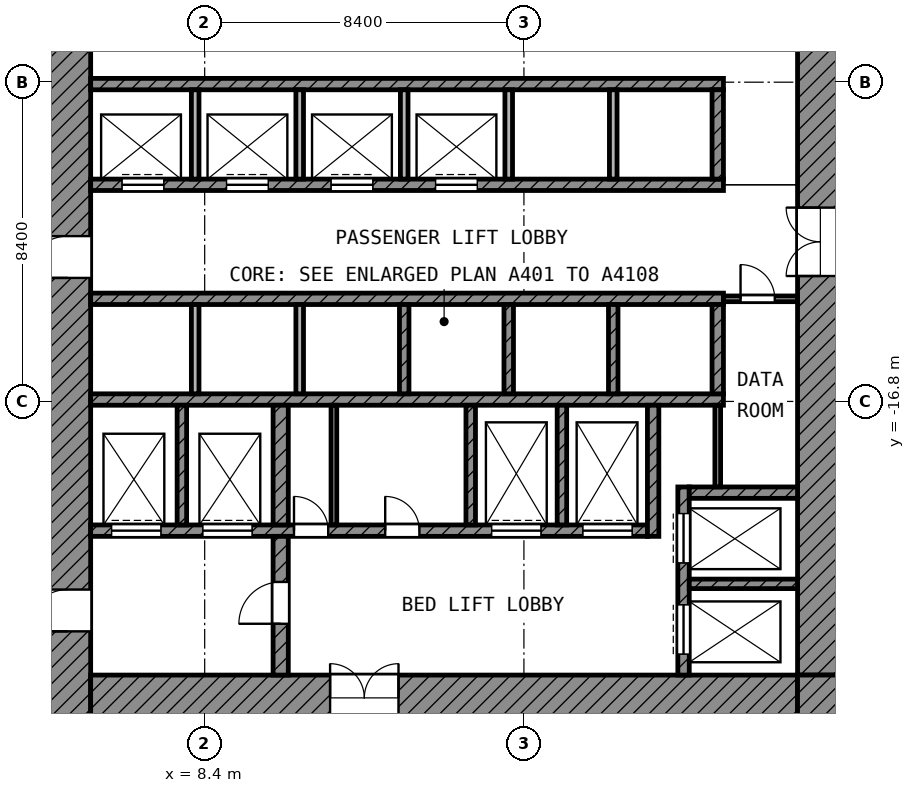
"""IFC4 building model, lengths in metres.
Left out: names, types, materials, properties, quantities, classifications, styles, units other than length and angle.
Written with IfcOpenShell. Run it as: python <this file> out.ifc"""

import sys

from ifc_helpers import new_model, si_unit, direction, frame, frame_2d, origin, place, context, subcontext, project, spatial, rectangle, extrude, element, fill, save


model = new_model("IFC4")
c1 = context("Model", 3, precision=1e-05, world=origin(), true_north=direction((0.0, 1.0)))
c2 = subcontext(c1, "Body", "Model", "MODEL_VIEW")
j1 = project(units=[si_unit("LENGTHUNIT", "METRE"), si_unit("PLANEANGLEUNIT", "RADIAN")], contexts=[c1])
p1 = place(None, origin())
s1 = spatial("IfcSite", under=j1, at=p1, CompositionType="ELEMENT")
p2 = place(p1, origin())
s2 = spatial("IfcBuilding", under=s1, at=p2, CompositionType="ELEMENT")
p3 = place(p2, frame((0.0, 0.0, 18.2)))
s3 = spatial("IfcBuildingStorey", under=s2, at=p3, CompositionType="ELEMENT", Elevation=18.2)
p4 = place(p3, frame((4.8, -25.2, 0.0), z_axis=(0.0, 0.0, 1.0), x_axis=(0.0, 1.0, 0.0)))
e1 = element("IfcWall", 1, at=p4, inside=s3, PredefinedType="SHEAR", context=c2, shape_type="SweptSolid", body=[
    extrude(rectangle(XDim=19.8, YDim=1.2, at=frame_2d((9.9, 0.0))), origin(), (0.0, 0.0, 1.0), 5.05),
])
p5 = place(p4, frame((11.65, 0.0, 0.0)))
e2 = element("IfcOpeningElement", 2, at=p5, cuts=e1, PredefinedType="OPENING", context=c2, shape_type="SweptSolid", body=[
    extrude(rectangle(XDim=1.1, YDim=2.1, at=frame_2d((0.55, 1.05))), frame((0.0, 0.61, 0.0), z_axis=(0.0, -1.0, 0.0), x_axis=(1.0, 0.0, 0.0)), (0.0, 0.0, 1.0), 1.22),
])
p6 = place(p4, frame((2.35, 0.0, 0.0)))
e3 = element("IfcOpeningElement", 3, at=p6, cuts=e1, PredefinedType="OPENING", context=c2, shape_type="SweptSolid", body=[
    extrude(rectangle(XDim=1.1, YDim=2.1, at=frame_2d((0.55, 1.05))), frame((0.0, 0.61, 0.0), z_axis=(0.0, -1.0, 0.0), x_axis=(1.0, 0.0, 0.0)), (0.0, 0.0, 1.0), 1.22),
])
p7 = place(p3, frame((24.6, -24.0, 0.0), z_axis=(0.0, 0.0, 1.0), x_axis=(0.0, 1.0, 0.0)))
e4 = element("IfcWall", 4, at=p7, inside=s3, PredefinedType="SHEAR", context=c2, shape_type="SweptSolid", body=[
    extrude(rectangle(XDim=18.6, YDim=1.2, at=frame_2d((9.3, 0.0))), origin(), (0.0, 0.0, 1.0), 5.05),
])
p8 = place(p7, frame((10.5, 0.0, 0.0)))
e5 = element("IfcOpeningElement", 5, at=p8, cuts=e4, PredefinedType="OPENING", context=c2, shape_type="SweptSolid", body=[
    extrude(rectangle(XDim=1.8, YDim=2.1, at=frame_2d((0.9, 1.05))), frame((0.0, 0.61, 0.0), z_axis=(0.0, -1.0, 0.0), x_axis=(1.0, 0.0, 0.0)), (0.0, 0.0, 1.0), 1.22),
])
p9 = place(p3, frame((5.4, -24.6, 0.0), z_axis=(0.0, 0.0, 1.0), x_axis=(1.0, 0.0, 0.0)))
e6 = element("IfcWall", 6, at=p9, inside=s3, PredefinedType="SHEAR", context=c2, shape_type="SweptSolid", body=[
    extrude(rectangle(XDim=18.6, YDim=1.2, at=frame_2d((9.3, 0.0))), origin(), (0.0, 0.0, 1.0), 5.05),
])
p10 = place(p9, frame((6.3, 0.0, 0.0)))
e7 = element("IfcOpeningElement", 7, at=p10, cuts=e6, PredefinedType="OPENING", context=c2, shape_type="SweptSolid", body=[
    extrude(rectangle(XDim=1.8, YDim=2.1, at=frame_2d((0.9, 1.05))), frame((0.0, 0.61, 0.0), z_axis=(0.0, -1.0, 0.0), x_axis=(1.0, 0.0, 0.0)), (0.0, 0.0, 1.0), 1.22),
])
p11 = place(p3, frame((24.6, -25.2, 0.0), z_axis=(0.0, 0.0, 1.0), x_axis=(0.0, 1.0, 0.0)))
e8 = element("IfcWall", 8, at=p11, inside=s3, PredefinedType="SHEAR", context=c2, shape_type="SweptSolid", body=[
    extrude(rectangle(XDim=1.2, YDim=1.2, at=frame_2d((0.6, 0.0))), origin(), (0.0, 0.0, 1.0), 5.05),
])
p12 = place(p3, frame((5.4, -8.45, 0.0), z_axis=(0.0, 0.0, 1.0), x_axis=(1.0, 0.0, 0.0)))
e9 = element("IfcWall", 9, at=p12, inside=s3, PredefinedType="SHEAR", context=c2, shape_type="SweptSolid", body=[
    extrude(rectangle(XDim=16.65, YDim=0.3, at=frame_2d((8.325, 0.0))), origin(), (0.0, 0.0, 1.0), 5.05),
])
p13 = place(p3, frame((5.4, -11.1, 0.0), z_axis=(0.0, 0.0, 1.0), x_axis=(1.0, 0.0, 0.0)))
e10 = element("IfcWall", 10, at=p13, inside=s3, PredefinedType="SHEAR", context=c2, shape_type="SweptSolid", body=[
    extrude(rectangle(XDim=16.65, YDim=0.3, at=frame_2d((8.325, 0.0))), origin(), (0.0, 0.0, 1.0), 5.05),
])
p14 = place(p13, frame((0.825, 0.0, 0.0)))
e11 = element("IfcOpeningElement", 11, at=p14, cuts=e10, PredefinedType="OPENING", context=c2, shape_type="SweptSolid", body=[
    extrude(rectangle(XDim=1.1, YDim=2.1, at=frame_2d((0.55, 1.05))), frame((0.0, 0.16, 0.0), z_axis=(0.0, -1.0, 0.0), x_axis=(1.0, 0.0, 0.0)), (0.0, 0.0, 1.0), 0.32),
])
p15 = place(p13, frame((3.575, 0.0, 0.0)))
e12 = element("IfcOpeningElement", 12, at=p15, cuts=e10, PredefinedType="OPENING", context=c2, shape_type="SweptSolid", body=[
    extrude(rectangle(XDim=1.1, YDim=2.1, at=frame_2d((0.55, 1.05))), frame((0.0, 0.16, 0.0), z_axis=(0.0, -1.0, 0.0), x_axis=(1.0, 0.0, 0.0)), (0.0, 0.0, 1.0), 0.32),
])
p16 = place(p13, frame((6.325, 0.0, 0.0)))
e13 = element("IfcOpeningElement", 13, at=p16, cuts=e10, PredefinedType="OPENING", context=c2, shape_type="SweptSolid", body=[
    extrude(rectangle(XDim=1.1, YDim=2.1, at=frame_2d((0.55, 1.05))), frame((0.0, 0.16, 0.0), z_axis=(0.0, -1.0, 0.0), x_axis=(1.0, 0.0, 0.0)), (0.0, 0.0, 1.0), 0.32),
])
p17 = place(p13, frame((9.075, 0.0, 0.0)))
e14 = element("IfcOpeningElement", 14, at=p17, cuts=e10, PredefinedType="OPENING", context=c2, shape_type="SweptSolid", body=[
    extrude(rectangle(XDim=1.1, YDim=2.1, at=frame_2d((0.55, 1.05))), frame((0.0, 0.16, 0.0), z_axis=(0.0, -1.0, 0.0), x_axis=(1.0, 0.0, 0.0)), (0.0, 0.0, 1.0), 0.32),
])
for number, where, z_axis, x_axis in (
    (15, (5.4, -14.1, 0.0), (0.0, 0.0, 1.0), (1.0, 0.0, 0.0)),
    (16, (5.4, -16.75, 0.0), (0.0, 0.0, 1.0), (1.0, 0.0, 0.0)),
):
    element("IfcWall", number, at=place(p3, frame(where, z_axis=z_axis, x_axis=x_axis)), inside=s3, PredefinedType="SHEAR", context=c2, shape_type="SweptSolid", body=[
        extrude(rectangle(XDim=16.65, YDim=0.3, at=frame_2d((8.325, 0.0))), origin(), (0.0, 0.0, 1.0), 5.05),
    ])
p18 = place(p3, frame((5.4, -20.2, 0.0), z_axis=(0.0, 0.0, 1.0), x_axis=(1.0, 0.0, 0.0)))
e17 = element("IfcWall", 17, at=p18, inside=s3, PredefinedType="SHEAR", context=c2, shape_type="SweptSolid", body=[
    extrude(rectangle(XDim=14.65, YDim=0.3, at=frame_2d((7.325, 0.0))), origin(), (0.0, 0.0, 1.0), 5.05),
])
p19 = place(p18, frame((10.55, 0.0, 0.0)))
e18 = element("IfcOpeningElement", 18, at=p19, cuts=e17, PredefinedType="OPENING", context=c2, shape_type="SweptSolid", body=[
    extrude(rectangle(XDim=1.3, YDim=2.1, at=frame_2d((0.65, 1.05))), frame((0.0, 0.16, 0.0), z_axis=(0.0, -1.0, 0.0), x_axis=(1.0, 0.0, 0.0)), (0.0, 0.0, 1.0), 0.32),
])
p20 = place(p18, frame((12.95, 0.0, 0.0)))
e19 = element("IfcOpeningElement", 19, at=p20, cuts=e17, PredefinedType="OPENING", context=c2, shape_type="SweptSolid", body=[
    extrude(rectangle(XDim=1.3, YDim=2.1, at=frame_2d((0.65, 1.05))), frame((0.0, 0.16, 0.0), z_axis=(0.0, -1.0, 0.0), x_axis=(1.0, 0.0, 0.0)), (0.0, 0.0, 1.0), 0.32),
])
p21 = place(p18, frame((0.55, 0.0, 0.0)))
e20 = element("IfcOpeningElement", 20, at=p21, cuts=e17, PredefinedType="OPENING", context=c2, shape_type="SweptSolid", body=[
    extrude(rectangle(XDim=1.3, YDim=2.1, at=frame_2d((0.65, 1.05))), frame((0.0, 0.16, 0.0), z_axis=(0.0, -1.0, 0.0), x_axis=(1.0, 0.0, 0.0)), (0.0, 0.0, 1.0), 0.32),
])
p22 = place(p18, frame((2.95, 0.0, 0.0)))
e21 = element("IfcOpeningElement", 21, at=p22, cuts=e17, PredefinedType="OPENING", context=c2, shape_type="SweptSolid", body=[
    extrude(rectangle(XDim=1.3, YDim=2.1, at=frame_2d((0.65, 1.05))), frame((0.0, 0.16, 0.0), z_axis=(0.0, -1.0, 0.0), x_axis=(1.0, 0.0, 0.0)), (0.0, 0.0, 1.0), 0.32),
])
p23 = place(p18, frame((5.35, 0.0, 0.0)))
e22 = element("IfcOpeningElement", 22, at=p23, cuts=e17, PredefinedType="OPENING", context=c2, shape_type="SweptSolid", body=[
    extrude(rectangle(XDim=0.9, YDim=2.1, at=frame_2d((0.45, 1.05))), frame((0.0, 0.16, 0.0), z_axis=(0.0, -1.0, 0.0), x_axis=(1.0, 0.0, 0.0)), (0.0, 0.0, 1.0), 0.32),
])
p24 = place(p18, frame((7.75, 0.0, 0.0)))
e23 = element("IfcOpeningElement", 23, at=p24, cuts=e17, PredefinedType="OPENING", context=c2, shape_type="SweptSolid", body=[
    extrude(rectangle(XDim=0.9, YDim=2.1, at=frame_2d((0.45, 1.05))), frame((0.0, 0.16, 0.0), z_axis=(0.0, -1.0, 0.0), x_axis=(1.0, 0.0, 0.0)), (0.0, 0.0, 1.0), 0.32),
])
p25 = place(p3, frame((10.4, -24.0, 0.0), z_axis=(0.0, 0.0, 1.0), x_axis=(0.0, 1.0, 0.0)))
e24 = element("IfcWall", 24, at=p25, inside=s3, PredefinedType="SHEAR", context=c2, shape_type="SweptSolid", body=[
    extrude(rectangle(XDim=3.65, YDim=0.4, at=frame_2d((1.825, 0.0))), origin(), (0.0, 0.0, 1.0), 5.05),
])
p26 = place(p25, frame((1.35, 0.0, 0.0)))
e25 = element("IfcOpeningElement", 25, at=p26, cuts=e24, PredefinedType="OPENING", context=c2, shape_type="SweptSolid", body=[
    extrude(rectangle(XDim=1.1, YDim=2.1, at=frame_2d((0.55, 1.05))), frame((0.0, 0.21, 0.0), z_axis=(0.0, -1.0, 0.0), x_axis=(1.0, 0.0, 0.0)), (0.0, 0.0, 1.0), 0.42),
])
p27 = place(p3, frame((10.4, -20.05, 0.0), z_axis=(0.0, 0.0, 1.0), x_axis=(0.0, 1.0, 0.0)))
e26 = element("IfcWall", 26, at=p27, inside=s3, PredefinedType="SHEAR", context=c2, shape_type="SweptSolid", body=[
    extrude(rectangle(XDim=3.15, YDim=0.4, at=frame_2d((1.575, 0.0))), origin(), (0.0, 0.0, 1.0), 5.05),
])
p28 = place(p3, frame((20.2, -20.35, 0.0), z_axis=(0.0, 0.0, 1.0), x_axis=(0.0, 1.0, 0.0)))
e27 = element("IfcWall", 27, at=p28, inside=s3, PredefinedType="SHEAR", context=c2, shape_type="SweptSolid", body=[
    extrude(rectangle(XDim=3.45, YDim=0.3, at=frame_2d((1.725, 0.0))), origin(), (0.0, 0.0, 1.0), 5.05),
])
p29 = place(p3, frame((21.9, -10.95, 0.0), z_axis=(0.0, 0.0, 1.0), x_axis=(0.0, 1.0, 0.0)))
e28 = element("IfcWall", 28, at=p29, inside=s3, PredefinedType="SHEAR", context=c2, shape_type="SweptSolid", body=[
    extrude(rectangle(XDim=2.35, YDim=0.3, at=frame_2d((1.175, 0.0))), origin(), (0.0, 0.0, 1.0), 5.05),
])
p30 = place(p3, frame((21.9, -16.6, 0.0), z_axis=(0.0, 0.0, 1.0), x_axis=(0.0, 1.0, 0.0)))
e29 = element("IfcWall", 29, at=p30, inside=s3, PredefinedType="SHEAR", context=c2, shape_type="SweptSolid", body=[
    extrude(rectangle(XDim=2.35, YDim=0.3, at=frame_2d((1.175, 0.0))), origin(), (0.0, 0.0, 1.0), 5.05),
])
p31 = place(p3, frame((21.15, -19.2, 0.0), z_axis=(0.0, 0.0, 1.0), x_axis=(1.0, 0.0, 0.0)))
e30 = element("IfcWall", 30, at=p31, inside=s3, PredefinedType="SHEAR", context=c2, shape_type="SweptSolid", body=[
    extrude(rectangle(XDim=2.85, YDim=0.3, at=frame_2d((1.425, 0.0))), origin(), (0.0, 0.0, 1.0), 5.05),
])
p32 = place(p3, frame((21.0, -24.0, 0.0), z_axis=(0.0, 0.0, 1.0), x_axis=(0.0, 1.0, 0.0)))
e31 = element("IfcWall", 31, at=p32, inside=s3, PredefinedType="SHEAR", context=c2, shape_type="SweptSolid", body=[
    extrude(rectangle(XDim=4.95, YDim=0.3, at=frame_2d((2.475, 0.0))), origin(), (0.0, 0.0, 1.0), 5.05),
])
p33 = place(p32, frame((2.95, 0.0, 0.0)))
e32 = element("IfcOpeningElement", 32, at=p33, cuts=e31, PredefinedType="OPENING", context=c2, shape_type="SweptSolid", body=[
    extrude(rectangle(XDim=1.3, YDim=2.1, at=frame_2d((0.65, 1.05))), frame((0.0, 0.16, 0.0), z_axis=(0.0, -1.0, 0.0), x_axis=(1.0, 0.0, 0.0)), (0.0, 0.0, 1.0), 0.32),
])
p34 = place(p32, frame((0.55, 0.0, 0.0)))
e33 = element("IfcOpeningElement", 33, at=p34, cuts=e31, PredefinedType="OPENING", context=c2, shape_type="SweptSolid", body=[
    extrude(rectangle(XDim=1.3, YDim=2.1, at=frame_2d((0.65, 1.05))), frame((0.0, 0.16, 0.0), z_axis=(0.0, -1.0, 0.0), x_axis=(1.0, 0.0, 0.0)), (0.0, 0.0, 1.0), 0.32),
])
p35 = place(p3, frame((21.15, -21.6, 0.0), z_axis=(0.0, 0.0, 1.0), x_axis=(1.0, 0.0, 0.0)))
e34 = element("IfcWall", 34, at=p35, inside=s3, PredefinedType="SHEAR", context=c2, shape_type="SweptSolid", body=[
    extrude(rectangle(XDim=2.85, YDim=0.25, at=frame_2d((1.425, 0.0))), origin(), (0.0, 0.0, 1.0), 5.05),
])
for number, where, z_axis, x_axis in (
    (35, (7.8, -20.05, 0.0), (0.0, 0.0, 1.0), (0.0, 1.0, 0.0)),
    (36, (15.4, -20.05, 0.0), (0.0, 0.0, 1.0), (0.0, 1.0, 0.0)),
    (37, (17.8, -20.05, 0.0), (0.0, 0.0, 1.0), (0.0, 1.0, 0.0)),
):
    element("IfcWall", number, at=place(p3, frame(where, z_axis=z_axis, x_axis=x_axis)), inside=s3, PredefinedType="SHEAR", context=c2, shape_type="SweptSolid", body=[
        extrude(rectangle(XDim=3.15, YDim=0.25, at=frame_2d((1.575, 0.0))), origin(), (0.0, 0.0, 1.0), 5.05),
    ])
for number, where, z_axis, x_axis in (
    (38, (8.15, -10.95, 0.0), (0.0, 0.0, 1.0), (0.0, 1.0, 0.0)),
    (39, (10.9, -10.95, 0.0), (0.0, 0.0, 1.0), (0.0, 1.0, 0.0)),
    (40, (13.65, -10.95, 0.0), (0.0, 0.0, 1.0), (0.0, 1.0, 0.0)),
    (41, (16.4, -10.95, 0.0), (0.0, 0.0, 1.0), (0.0, 1.0, 0.0)),
    (42, (19.15, -10.95, 0.0), (0.0, 0.0, 1.0), (0.0, 1.0, 0.0)),
):
    element("IfcWall", number, at=place(p3, frame(where, z_axis=z_axis, x_axis=x_axis)), inside=s3, PredefinedType="PARTITIONING", context=c2, shape_type="SweptSolid", body=[
        extrude(rectangle(XDim=2.35, YDim=0.2, at=frame_2d((1.175, 0.0))), origin(), (0.0, 0.0, 1.0), 5.05),
    ])
for number, where, z_axis, x_axis in (
    (43, (8.15, -16.6, 0.0), (0.0, 0.0, 1.0), (0.0, 1.0, 0.0)),
    (44, (10.9, -16.6, 0.0), (0.0, 0.0, 1.0), (0.0, 1.0, 0.0)),
):
    element("IfcWall", number, at=place(p3, frame(where, z_axis=z_axis, x_axis=x_axis)), inside=s3, PredefinedType="PARTITIONING", context=c2, shape_type="SweptSolid", body=[
        extrude(rectangle(XDim=2.35, YDim=0.2, at=frame_2d((1.175, 0.0))), origin(), (0.0, 0.0, 1.0), 5.05),
    ])
for number, where, z_axis, x_axis in (
    (45, (13.65, -16.6, 0.0), (0.0, 0.0, 1.0), (0.0, 1.0, 0.0)),
    (46, (16.4, -16.6, 0.0), (0.0, 0.0, 1.0), (0.0, 1.0, 0.0)),
    (47, (19.15, -16.6, 0.0), (0.0, 0.0, 1.0), (0.0, 1.0, 0.0)),
):
    element("IfcWall", number, at=place(p3, frame(where, z_axis=z_axis, x_axis=x_axis)), inside=s3, PredefinedType="SHEAR", context=c2, shape_type="SweptSolid", body=[
        extrude(rectangle(XDim=2.35, YDim=0.25, at=frame_2d((1.175, 0.0))), origin(), (0.0, 0.0, 1.0), 5.05),
    ])
p36 = place(p3, frame((21.9, -19.05, 0.0), z_axis=(0.0, 0.0, 1.0), x_axis=(0.0, 1.0, 0.0)))
e48 = element("IfcWall", 48, at=p36, inside=s3, PredefinedType="PARTITIONING", context=c2, shape_type="SweptSolid", body=[
    extrude(rectangle(XDim=2.15, YDim=0.15, at=frame_2d((1.075, 0.0))), origin(), (0.0, 0.0, 1.0), 5.05),
])
p37 = place(p3, frame((22.05, -14.1, 0.0), z_axis=(0.0, 0.0, 1.0), x_axis=(1.0, 0.0, 0.0)))
e49 = element("IfcWall", 49, at=p37, inside=s3, PredefinedType="PARTITIONING", context=c2, shape_type="SweptSolid", body=[
    extrude(rectangle(XDim=1.95, YDim=0.15, at=frame_2d((0.975, 0.0))), origin(), (0.0, 0.0, 1.0), 5.05),
])
p38 = place(p37, frame((0.45, 0.0, 0.0)))
e50 = element("IfcOpeningElement", 50, at=p38, cuts=e49, PredefinedType="OPENING", context=c2, shape_type="SweptSolid", body=[
    extrude(rectangle(XDim=0.9, YDim=2.1, at=frame_2d((0.45, 1.05))), frame((0.0, 0.085, 0.0), z_axis=(0.0, -1.0, 0.0), x_axis=(1.0, 0.0, 0.0)), (0.0, 0.0, 1.0), 0.17),
])
p39 = place(p3, frame((11.8, -20.05, 0.0), z_axis=(0.0, 0.0, 1.0), x_axis=(0.0, 1.0, 0.0)))
e51 = element("IfcWall", 51, at=p39, inside=s3, PredefinedType="PARTITIONING", context=c2, shape_type="SweptSolid", body=[
    extrude(rectangle(XDim=3.15, YDim=0.15, at=frame_2d((1.575, 0.0))), origin(), (0.0, 0.0, 1.0), 5.05),
])
p40 = place(p14, origin())
e52 = element("IfcDoor", 52, at=p40, inside=s3, OperationType="DOUBLE_DOOR_SLIDING", PredefinedType="DOOR", context=c2, shape_type="SweptSolid", body=[
    extrude(rectangle(XDim=1.1, YDim=2.1, at=frame_2d((0.55, 1.05))), frame((0.0, 0.025, 0.0), z_axis=(0.0, -1.0, 0.0), x_axis=(1.0, 0.0, 0.0)), (0.0, 0.0, 1.0), 0.05),
])
fill(e11, e52)
p41 = place(p15, origin())
e53 = element("IfcDoor", 53, at=p41, inside=s3, OperationType="DOUBLE_DOOR_SLIDING", PredefinedType="DOOR", context=c2, shape_type="SweptSolid", body=[
    extrude(rectangle(XDim=1.1, YDim=2.1, at=frame_2d((0.55, 1.05))), frame((0.0, 0.025, 0.0), z_axis=(0.0, -1.0, 0.0), x_axis=(1.0, 0.0, 0.0)), (0.0, 0.0, 1.0), 0.05),
])
fill(e12, e53)
p42 = place(p16, origin())
e54 = element("IfcDoor", 54, at=p42, inside=s3, OperationType="DOUBLE_DOOR_SLIDING", PredefinedType="DOOR", context=c2, shape_type="SweptSolid", body=[
    extrude(rectangle(XDim=1.1, YDim=2.1, at=frame_2d((0.55, 1.05))), frame((0.0, 0.025, 0.0), z_axis=(0.0, -1.0, 0.0), x_axis=(1.0, 0.0, 0.0)), (0.0, 0.0, 1.0), 0.05),
])
fill(e13, e54)
p43 = place(p17, origin())
e55 = element("IfcDoor", 55, at=p43, inside=s3, OperationType="DOUBLE_DOOR_SLIDING", PredefinedType="DOOR", context=c2, shape_type="SweptSolid", body=[
    extrude(rectangle(XDim=1.1, YDim=2.1, at=frame_2d((0.55, 1.05))), frame((0.0, 0.025, 0.0), z_axis=(0.0, -1.0, 0.0), x_axis=(1.0, 0.0, 0.0)), (0.0, 0.0, 1.0), 0.05),
])
fill(e14, e55)
p44 = place(p33, origin())
e56 = element("IfcDoor", 56, at=p44, inside=s3, OperationType="DOUBLE_DOOR_SLIDING", PredefinedType="DOOR", context=c2, shape_type="SweptSolid", body=[
    extrude(rectangle(XDim=1.3, YDim=2.1, at=frame_2d((0.65, 1.05))), frame((0.0, 0.025, 0.0), z_axis=(0.0, -1.0, 0.0), x_axis=(1.0, 0.0, 0.0)), (0.0, 0.0, 1.0), 0.05),
])
fill(e32, e56)
p45 = place(p34, origin())
e57 = element("IfcDoor", 57, at=p45, inside=s3, OperationType="DOUBLE_DOOR_SLIDING", PredefinedType="DOOR", context=c2, shape_type="SweptSolid", body=[
    extrude(rectangle(XDim=1.3, YDim=2.1, at=frame_2d((0.65, 1.05))), frame((0.0, 0.025, 0.0), z_axis=(0.0, -1.0, 0.0), x_axis=(1.0, 0.0, 0.0)), (0.0, 0.0, 1.0), 0.05),
])
fill(e33, e57)
p46 = place(p19, origin())
e58 = element("IfcDoor", 58, at=p46, inside=s3, OperationType="DOUBLE_DOOR_SLIDING", PredefinedType="DOOR", context=c2, shape_type="SweptSolid", body=[
    extrude(rectangle(XDim=1.3, YDim=2.1, at=frame_2d((0.65, 1.05))), frame((0.0, 0.025, 0.0), z_axis=(0.0, -1.0, 0.0), x_axis=(1.0, 0.0, 0.0)), (0.0, 0.0, 1.0), 0.05),
])
fill(e18, e58)
p47 = place(p20, origin())
e59 = element("IfcDoor", 59, at=p47, inside=s3, OperationType="DOUBLE_DOOR_SLIDING", PredefinedType="DOOR", context=c2, shape_type="SweptSolid", body=[
    extrude(rectangle(XDim=1.3, YDim=2.1, at=frame_2d((0.65, 1.05))), frame((0.0, 0.025, 0.0), z_axis=(0.0, -1.0, 0.0), x_axis=(1.0, 0.0, 0.0)), (0.0, 0.0, 1.0), 0.05),
])
fill(e19, e59)
p48 = place(p21, origin())
e60 = element("IfcDoor", 60, at=p48, inside=s3, OperationType="DOUBLE_DOOR_SLIDING", PredefinedType="DOOR", context=c2, shape_type="SweptSolid", body=[
    extrude(rectangle(XDim=1.3, YDim=2.1, at=frame_2d((0.65, 1.05))), frame((0.0, 0.025, 0.0), z_axis=(0.0, -1.0, 0.0), x_axis=(1.0, 0.0, 0.0)), (0.0, 0.0, 1.0), 0.05),
])
fill(e20, e60)
p49 = place(p22, origin())
e61 = element("IfcDoor", 61, at=p49, inside=s3, OperationType="DOUBLE_DOOR_SLIDING", PredefinedType="DOOR", context=c2, shape_type="SweptSolid", body=[
    extrude(rectangle(XDim=1.3, YDim=2.1, at=frame_2d((0.65, 1.05))), frame((0.0, 0.025, 0.0), z_axis=(0.0, -1.0, 0.0), x_axis=(1.0, 0.0, 0.0)), (0.0, 0.0, 1.0), 0.05),
])
fill(e21, e61)
p50 = place(p5, origin())
e62 = element("IfcDoor", 62, at=p50, inside=s3, OperationType="SINGLE_SWING_LEFT", PredefinedType="DOOR", context=c2, shape_type="SweptSolid", body=[
    extrude(rectangle(XDim=1.1, YDim=2.1, at=frame_2d((0.55, 1.05))), frame((0.0, 0.025, 0.0), z_axis=(0.0, -1.0, 0.0), x_axis=(1.0, 0.0, 0.0)), (0.0, 0.0, 1.0), 0.05),
])
fill(e2, e62)
p51 = place(p6, origin())
e63 = element("IfcDoor", 63, at=p51, inside=s3, OperationType="SINGLE_SWING_LEFT", PredefinedType="DOOR", context=c2, shape_type="SweptSolid", body=[
    extrude(rectangle(XDim=1.1, YDim=2.1, at=frame_2d((0.55, 1.05))), frame((0.0, 0.025, 0.0), z_axis=(0.0, -1.0, 0.0), x_axis=(1.0, 0.0, 0.0)), (0.0, 0.0, 1.0), 0.05),
])
fill(e3, e63)
p52 = place(p26, origin())
e64 = element("IfcDoor", 64, at=p52, inside=s3, OperationType="SINGLE_SWING_LEFT", PredefinedType="DOOR", context=c2, shape_type="SweptSolid", body=[
    extrude(rectangle(XDim=1.1, YDim=2.1, at=frame_2d((0.55, 1.05))), frame((0.0, 0.025, 0.0), z_axis=(0.0, -1.0, 0.0), x_axis=(1.0, 0.0, 0.0)), (0.0, 0.0, 1.0), 0.05),
])
fill(e25, e64)
p53 = place(p8, origin())
e65 = element("IfcDoor", 65, at=p53, inside=s3, OperationType="DOUBLE_DOOR_SINGLE_SWING", PredefinedType="DOOR", context=c2, shape_type="SweptSolid", body=[
    extrude(rectangle(XDim=1.8, YDim=2.1, at=frame_2d((0.9, 1.05))), frame((0.0, 0.025, 0.0), z_axis=(0.0, -1.0, 0.0), x_axis=(1.0, 0.0, 0.0)), (0.0, 0.0, 1.0), 0.05),
])
fill(e5, e65)
p54 = place(p10, origin())
e66 = element("IfcDoor", 66, at=p54, inside=s3, OperationType="DOUBLE_DOOR_SINGLE_SWING", PredefinedType="DOOR", context=c2, shape_type="SweptSolid", body=[
    extrude(rectangle(XDim=1.8, YDim=2.1, at=frame_2d((0.9, 1.05))), frame((0.0, 0.025, 0.0), z_axis=(0.0, -1.0, 0.0), x_axis=(1.0, 0.0, 0.0)), (0.0, 0.0, 1.0), 0.05),
])
fill(e7, e66)
p55 = place(p38, origin())
e67 = element("IfcDoor", 67, at=p55, inside=s3, OperationType="SINGLE_SWING_LEFT", PredefinedType="DOOR", context=c2, shape_type="SweptSolid", body=[
    extrude(rectangle(XDim=0.9, YDim=2.1, at=frame_2d((0.45, 1.05))), frame((0.0, 0.025, 0.0), z_axis=(0.0, -1.0, 0.0), x_axis=(1.0, 0.0, 0.0)), (0.0, 0.0, 1.0), 0.05),
])
fill(e50, e67)
p56 = place(p23, origin())
e68 = element("IfcDoor", 68, at=p56, inside=s3, OperationType="SINGLE_SWING_LEFT", PredefinedType="DOOR", context=c2, shape_type="SweptSolid", body=[
    extrude(rectangle(XDim=0.9, YDim=2.1, at=frame_2d((0.45, 1.05))), frame((0.0, 0.025, 0.0), z_axis=(0.0, -1.0, 0.0), x_axis=(1.0, 0.0, 0.0)), (0.0, 0.0, 1.0), 0.05),
])
fill(e22, e68)
p57 = place(p24, origin())
e69 = element("IfcDoor", 69, at=p57, inside=s3, OperationType="SINGLE_SWING_LEFT", PredefinedType="DOOR", context=c2, shape_type="SweptSolid", body=[
    extrude(rectangle(XDim=0.9, YDim=2.1, at=frame_2d((0.45, 1.05))), frame((0.0, 0.025, 0.0), z_axis=(0.0, -1.0, 0.0), x_axis=(1.0, 0.0, 0.0)), (0.0, 0.0, 1.0), 0.05),
])
fill(e23, e69)
save(model, sys.argv[1])
